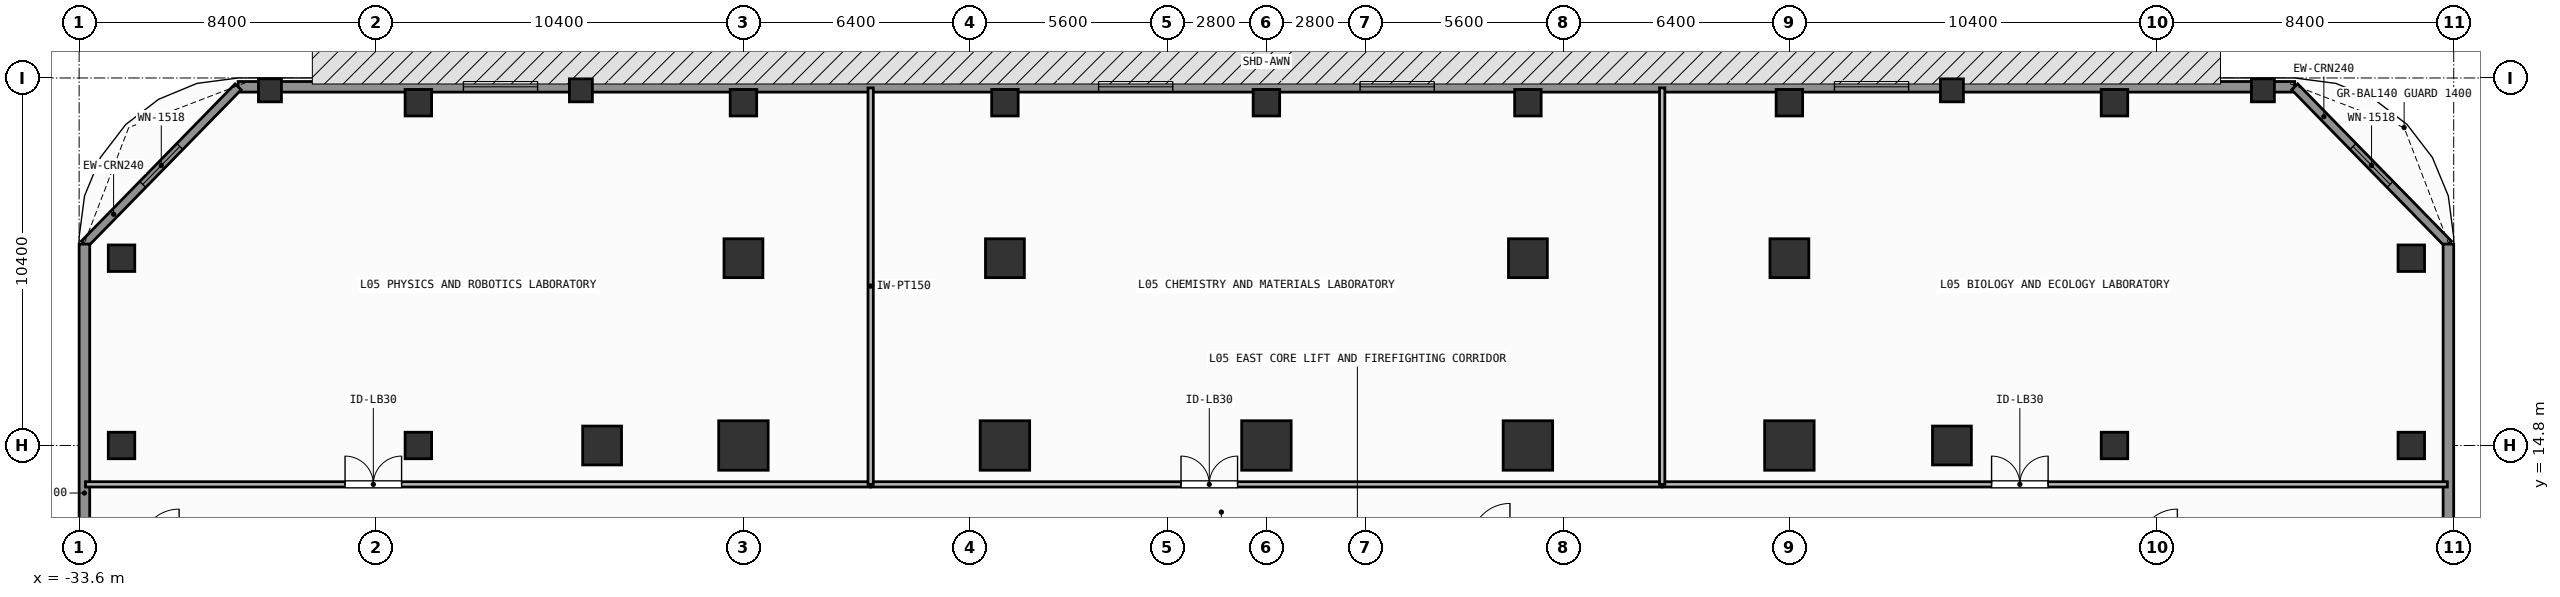
"""IFC4 building model, lengths in metres.
Left out: names, types, materials, properties, quantities, classifications, styles, units other than length and angle.
Written with IfcOpenShell. Run it as: python <this file> out.ifc"""

import sys

from ifc_helpers import new_model, si_unit, direction, frame, frame_2d, origin, origin_2d, place, context, subcontext, project, spatial, rectangle, extrude, element, fill, save


model = new_model("IFC4")
c1 = context("Model", 3, precision=1e-05, world=origin(), true_north=direction((0.0, 1.0)))
c2 = subcontext(c1, "Body", "Model", "MODEL_VIEW")
j1 = project(units=[si_unit("LENGTHUNIT", "METRE"), si_unit("PLANEANGLEUNIT", "RADIAN")], contexts=[c1])
p1 = place(None, origin())
s1 = spatial("IfcSite", under=j1, at=p1, CompositionType="ELEMENT")
p2 = place(p1, origin())
s2 = spatial("IfcBuilding", under=s1, at=p2, CompositionType="ELEMENT")
p3 = place(p2, frame((0.0, 0.0, 17.4)))
s3 = spatial("IfcBuildingStorey", under=s2, at=p3, CompositionType="ELEMENT", Elevation=17.4)
for number, where, z_axis, x_axis in (
    (1, (-14.8, 14.8, 0.0), (0.0, 0.0, 1.0), (1.0, 0.0, 0.0)),
    (2, (-7.4, 14.8, 0.0), (0.0, 0.0, 1.0), (1.0, 0.0, 0.0)),
    (3, (0.0, 14.8, 0.0), (0.0, 0.0, 1.0), (1.0, 0.0, 0.0)),
    (4, (7.4, 14.8, 0.0), (0.0, 0.0, 1.0), (1.0, 0.0, 0.0)),
    (5, (14.8, 14.8, 0.0), (0.0, 0.0, 1.0), (1.0, 0.0, 0.0)),
):
    element("IfcColumn", number, at=place(p3, frame(where, z_axis=z_axis, x_axis=x_axis)), inside=s3, PredefinedType="COLUMN", context=c2, shape_type="SweptSolid", body=[
        extrude(rectangle(XDim=1.4, YDim=1.4, at=origin_2d()), origin(), (0.0, 0.0, 1.0), 4.2),
    ])
for number, where, z_axis, x_axis in (
    (6, (-18.8, 14.8, 0.0), (0.0, 0.0, 1.0), (1.0, 0.0, 0.0)),
    (7, (19.4, 14.8, 0.0), (0.0, 0.0, 1.0), (1.0, 0.0, 0.0)),
    (8, (-14.8, 20.1, 0.0), (0.0, 0.0, 1.0), (1.0, 0.0, 0.0)),
    (9, (-7.4, 20.1, 0.0), (0.0, 0.0, 1.0), (1.0, 0.0, 0.0)),
    (10, (7.4, 20.1, 0.0), (0.0, 0.0, 1.0), (1.0, 0.0, 0.0)),
    (11, (14.8, 20.1, 0.0), (0.0, 0.0, 1.0), (1.0, 0.0, 0.0)),
):
    element("IfcColumn", number, at=place(p3, frame(where, z_axis=z_axis, x_axis=x_axis)), inside=s3, PredefinedType="COLUMN", context=c2, shape_type="SweptSolid", body=[
        extrude(rectangle(XDim=1.1, YDim=1.1, at=origin_2d()), origin(), (0.0, 0.0, 1.0), 4.2),
    ])
for number, where, z_axis, x_axis in (
    (12, (-32.4, 14.8, 0.0), (0.0, 0.0, 1.0), (1.0, 0.0, 0.0)),
    (13, (-24.0, 14.8, 0.0), (0.0, 0.0, 1.0), (1.0, 0.0, 0.0)),
    (14, (-24.0, 24.5, 0.0), (0.0, 0.0, 1.0), (1.0, 0.0, 0.0)),
    (15, (-14.8, 24.5, 0.0), (0.0, 0.0, 1.0), (1.0, 0.0, 0.0)),
    (16, (-7.4, 24.5, 0.0), (0.0, 0.0, 1.0), (1.0, 0.0, 0.0)),
    (17, (0.0, 24.5, 0.0), (0.0, 0.0, 1.0), (1.0, 0.0, 0.0)),
    (18, (7.4, 24.5, 0.0), (0.0, 0.0, 1.0), (1.0, 0.0, 0.0)),
    (19, (14.8, 24.5, 0.0), (0.0, 0.0, 1.0), (1.0, 0.0, 0.0)),
    (20, (24.0, 14.8, 0.0), (0.0, 0.0, 1.0), (1.0, 0.0, 0.0)),
    (21, (24.0, 24.5, 0.0), (0.0, 0.0, 1.0), (1.0, 0.0, 0.0)),
    (22, (32.4, 14.8, 0.0), (0.0, 0.0, 1.0), (1.0, 0.0, 0.0)),
    (23, (-32.4, 20.1, 0.0), (0.0, 0.0, 1.0), (1.0, 0.0, 0.0)),
    (24, (32.4, 20.1, 0.0), (0.0, 0.0, 1.0), (1.0, 0.0, 0.0)),
):
    element("IfcColumn", number, at=place(p3, frame(where, z_axis=z_axis, x_axis=x_axis)), inside=s3, PredefinedType="COLUMN", context=c2, shape_type="SweptSolid", body=[
        extrude(rectangle(XDim=0.75, YDim=0.75, at=origin_2d()), origin(), (0.0, 0.0, 1.0), 4.2),
    ])
for number, where, z_axis, x_axis in (
    (25, (-28.2, 24.85, 0.0), (0.0, 0.0, 1.0), (1.0, 0.0, 0.0)),
    (26, (-19.4, 24.85, 0.0), (0.0, 0.0, 1.0), (1.0, 0.0, 0.0)),
    (27, (19.4, 24.85, 0.0), (0.0, 0.0, 1.0), (1.0, 0.0, 0.0)),
    (28, (28.2, 24.85, 0.0), (0.0, 0.0, 1.0), (1.0, 0.0, 0.0)),
):
    element("IfcColumn", number, at=place(p3, frame(where, z_axis=z_axis, x_axis=x_axis)), inside=s3, PredefinedType="PILASTER", context=c2, shape_type="SweptSolid", body=[
        extrude(rectangle(XDim=0.65, YDim=0.65, at=origin_2d()), origin(), (0.0, 0.0, 1.0), 4.2),
    ])
p4 = place(p3, frame((-29.1, 24.95, 0.0), z_axis=(0.0, 0.0, 1.0), x_axis=(1.0, 0.0, 0.0)))
e29 = element("IfcWall", 29, at=p4, inside=s3, PredefinedType="SOLIDWALL", context=c2, shape_type="SweptSolid", body=[
    extrude(rectangle(XDim=58.2, YDim=0.3, at=frame_2d((29.1, 0.0))), origin(), (0.0, 0.0, 1.0), 3.96),
])
p5 = place(p4, frame((6.375, 0.0, 0.85)))
e30 = element("IfcOpeningElement", 30, at=p5, cuts=e29, PredefinedType="OPENING", context=c2, shape_type="SweptSolid", body=[
    extrude(rectangle(XDim=2.1, YDim=2.2, at=frame_2d((1.05, 1.1))), frame((0.0, 0.16, 0.0), z_axis=(0.0, -1.0, 0.0), x_axis=(1.0, 0.0, 0.0)), (0.0, 0.0, 1.0), 0.32),
])
p6 = place(p4, frame((24.35, 0.0, 0.85)))
e31 = element("IfcOpeningElement", 31, at=p6, cuts=e29, PredefinedType="OPENING", context=c2, shape_type="SweptSolid", body=[
    extrude(rectangle(XDim=2.1, YDim=2.2, at=frame_2d((1.05, 1.1))), frame((0.0, 0.16, 0.0), z_axis=(0.0, -1.0, 0.0), x_axis=(1.0, 0.0, 0.0)), (0.0, 0.0, 1.0), 0.32),
])
p7 = place(p4, frame((31.75, 0.0, 0.85)))
e32 = element("IfcOpeningElement", 32, at=p7, cuts=e29, PredefinedType="OPENING", context=c2, shape_type="SweptSolid", body=[
    extrude(rectangle(XDim=2.1, YDim=2.2, at=frame_2d((1.05, 1.1))), frame((0.0, 0.16, 0.0), z_axis=(0.0, -1.0, 0.0), x_axis=(1.0, 0.0, 0.0)), (0.0, 0.0, 1.0), 0.32),
])
p8 = place(p4, frame((45.175, 0.0, 0.85)))
e33 = element("IfcOpeningElement", 33, at=p8, cuts=e29, PredefinedType="OPENING", context=c2, shape_type="SweptSolid", body=[
    extrude(rectangle(XDim=2.1, YDim=2.2, at=frame_2d((1.05, 1.1))), frame((0.0, 0.16, 0.0), z_axis=(0.0, -1.0, 0.0), x_axis=(1.0, 0.0, 0.0)), (0.0, 0.0, 1.0), 0.32),
])
p9 = place(p3, frame((-33.45, 20.5, 0.0), z_axis=(0.0, 0.0, 1.0), x_axis=(0.69901822973, 0.715103848756, 0.0)))
e34 = element("IfcWall", 34, at=p9, inside=s3, PredefinedType="SOLIDWALL", context=c2, shape_type="SweptSolid", body=[
    extrude(rectangle(XDim=6.223, YDim=0.24, at=frame_2d((3.111, 0.0))), origin(), (0.0, 0.0, 1.0), 3.96),
])
p10 = place(p9, frame((2.362, 0.0, 0.85)))
e35 = element("IfcOpeningElement", 35, at=p10, cuts=e34, PredefinedType="OPENING", context=c2, shape_type="SweptSolid", body=[
    extrude(rectangle(XDim=1.5, YDim=1.85, at=frame_2d((0.75, 0.925))), frame((0.0, 0.13, 0.0), z_axis=(0.0, -1.0, 0.0), x_axis=(1.0, 0.0, 0.0)), (0.0, 0.0, 1.0), 0.26),
])
p11 = place(p3, frame((29.1, 24.95, 0.0), z_axis=(0.0, 0.0, 1.0), x_axis=(0.69901822973, -0.715103848756, 0.0)))
e36 = element("IfcWall", 36, at=p11, inside=s3, PredefinedType="SOLIDWALL", context=c2, shape_type="SweptSolid", body=[
    extrude(rectangle(XDim=6.223, YDim=0.24, at=frame_2d((3.111, 0.0))), origin(), (0.0, 0.0, 1.0), 3.96),
])
p12 = place(p11, frame((2.362, 0.0, 0.85)))
e37 = element("IfcOpeningElement", 37, at=p12, cuts=e36, PredefinedType="OPENING", context=c2, shape_type="SweptSolid", body=[
    extrude(rectangle(XDim=1.5, YDim=1.85, at=frame_2d((0.75, 0.925))), frame((0.0, 0.13, 0.0), z_axis=(0.0, -1.0, 0.0), x_axis=(1.0, 0.0, 0.0)), (0.0, 0.0, 1.0), 0.26),
])
for number, where, z_axis, x_axis in (
    (38, (-33.45, 6.41, 0.0), (0.0, 0.0, 1.0), (0.0, 1.0, 0.0)),
    (39, (33.45, 6.41, 0.0), (0.0, 0.0, 1.0), (0.0, 1.0, 0.0)),
):
    element("IfcWall", number, at=place(p3, frame(where, z_axis=z_axis, x_axis=x_axis)), inside=s3, PredefinedType="SOLIDWALL", context=c2, shape_type="SweptSolid", body=[
        extrude(rectangle(XDim=14.09, YDim=0.3, at=frame_2d((7.045, 0.0))), origin(), (0.0, 0.0, 1.0), 3.96),
    ])
p13 = place(p3, frame((-33.42, 13.7, 0.0), z_axis=(0.0, 0.0, 1.0), x_axis=(1.0, 0.0, 0.0)))
e40 = element("IfcWall", 40, at=p13, inside=s3, PredefinedType="PARTITIONING", context=c2, shape_type="SweptSolid", body=[
    extrude(rectangle(XDim=22.22, YDim=0.15, at=frame_2d((11.11, 0.0))), origin(), (0.0, 0.0, 1.0), 3.96),
])
p14 = place(p13, frame((7.346, 0.0, 0.0)))
e41 = element("IfcOpeningElement", 41, at=p14, cuts=e40, PredefinedType="OPENING", context=c2, shape_type="SweptSolid", body=[
    extrude(rectangle(XDim=1.6, YDim=2.3, at=frame_2d((0.8, 1.15))), frame((0.0, 0.085, 0.0), z_axis=(0.0, -1.0, 0.0), x_axis=(1.0, 0.0, 0.0)), (0.0, 0.0, 1.0), 0.17),
])
p15 = place(p3, frame((-11.2, 13.7, 0.0), z_axis=(0.0, 0.0, 1.0), x_axis=(1.0, 0.0, 0.0)))
e42 = element("IfcWall", 42, at=p15, inside=s3, PredefinedType="PARTITIONING", context=c2, shape_type="SweptSolid", body=[
    extrude(rectangle(XDim=22.4, YDim=0.15, at=frame_2d((11.2, 0.0))), origin(), (0.0, 0.0, 1.0), 3.96),
])
p16 = place(p15, frame((8.783, 0.0, 0.0)))
e43 = element("IfcOpeningElement", 43, at=p16, cuts=e42, PredefinedType="OPENING", context=c2, shape_type="SweptSolid", body=[
    extrude(rectangle(XDim=1.6, YDim=2.3, at=frame_2d((0.8, 1.15))), frame((0.0, 0.085, 0.0), z_axis=(0.0, -1.0, 0.0), x_axis=(1.0, 0.0, 0.0)), (0.0, 0.0, 1.0), 0.17),
])
p17 = place(p3, frame((11.2, 13.7, 0.0), z_axis=(0.0, 0.0, 1.0), x_axis=(1.0, 0.0, 0.0)))
e44 = element("IfcWall", 44, at=p17, inside=s3, PredefinedType="PARTITIONING", context=c2, shape_type="SweptSolid", body=[
    extrude(rectangle(XDim=22.22, YDim=0.15, at=frame_2d((11.11, 0.0))), origin(), (0.0, 0.0, 1.0), 3.96),
])
p18 = place(p17, frame((9.322, 0.0, 0.0)))
e45 = element("IfcOpeningElement", 45, at=p18, cuts=e44, PredefinedType="OPENING", context=c2, shape_type="SweptSolid", body=[
    extrude(rectangle(XDim=1.6, YDim=2.3, at=frame_2d((0.8, 1.15))), frame((0.0, 0.085, 0.0), z_axis=(0.0, -1.0, 0.0), x_axis=(1.0, 0.0, 0.0)), (0.0, 0.0, 1.0), 0.17),
])
for number, where, z_axis, x_axis in (
    (46, (-11.2, 13.7, 0.0), (0.0, 0.0, 1.0), (0.0, 1.0, 0.0)),
    (47, (11.2, 13.7, 0.0), (0.0, 0.0, 1.0), (0.0, 1.0, 0.0)),
):
    element("IfcWall", number, at=place(p3, frame(where, z_axis=z_axis, x_axis=x_axis)), inside=s3, PredefinedType="PARTITIONING", context=c2, shape_type="SweptSolid", body=[
        extrude(rectangle(XDim=11.22, YDim=0.15, at=frame_2d((5.61, 0.0))), origin(), (0.0, 0.0, 1.0), 3.96),
    ])
p19 = place(p10, origin())
e48 = element("IfcWindow", 48, at=p19, inside=s3, PartitioningType="SINGLE_PANEL", PredefinedType="WINDOW", context=c2, shape_type="SweptSolid", body=[
    extrude(rectangle(XDim=1.5, YDim=1.85, at=frame_2d((0.75, 0.925))), frame((0.0, 0.03, 0.0), z_axis=(0.0, -1.0, 0.0), x_axis=(1.0, 0.0, 0.0)), (0.0, 0.0, 1.0), 0.06),
])
fill(e35, e48)
p20 = place(p12, origin())
e49 = element("IfcWindow", 49, at=p20, inside=s3, PartitioningType="SINGLE_PANEL", PredefinedType="WINDOW", context=c2, shape_type="SweptSolid", body=[
    extrude(rectangle(XDim=1.5, YDim=1.85, at=frame_2d((0.75, 0.925))), frame((0.0, 0.03, 0.0), z_axis=(0.0, -1.0, 0.0), x_axis=(1.0, 0.0, 0.0)), (0.0, 0.0, 1.0), 0.06),
])
fill(e37, e49)
p21 = place(p5, origin())
e50 = element("IfcWindow", 50, at=p21, inside=s3, PartitioningType="SINGLE_PANEL", PredefinedType="WINDOW", context=c2, shape_type="SweptSolid", body=[
    extrude(rectangle(XDim=2.1, YDim=2.2, at=frame_2d((1.05, 1.1))), frame((0.0, 0.03, 0.0), z_axis=(0.0, -1.0, 0.0), x_axis=(1.0, 0.0, 0.0)), (0.0, 0.0, 1.0), 0.06),
])
fill(e30, e50)
p22 = place(p6, origin())
e51 = element("IfcWindow", 51, at=p22, inside=s3, PartitioningType="SINGLE_PANEL", PredefinedType="WINDOW", context=c2, shape_type="SweptSolid", body=[
    extrude(rectangle(XDim=2.1, YDim=2.2, at=frame_2d((1.05, 1.1))), frame((0.0, 0.03, 0.0), z_axis=(0.0, -1.0, 0.0), x_axis=(1.0, 0.0, 0.0)), (0.0, 0.0, 1.0), 0.06),
])
fill(e31, e51)
p23 = place(p7, origin())
e52 = element("IfcWindow", 52, at=p23, inside=s3, PartitioningType="SINGLE_PANEL", PredefinedType="WINDOW", context=c2, shape_type="SweptSolid", body=[
    extrude(rectangle(XDim=2.1, YDim=2.2, at=frame_2d((1.05, 1.1))), frame((0.0, 0.03, 0.0), z_axis=(0.0, -1.0, 0.0), x_axis=(1.0, 0.0, 0.0)), (0.0, 0.0, 1.0), 0.06),
])
fill(e32, e52)
p24 = place(p8, origin())
e53 = element("IfcWindow", 53, at=p24, inside=s3, PartitioningType="SINGLE_PANEL", PredefinedType="WINDOW", context=c2, shape_type="SweptSolid", body=[
    extrude(rectangle(XDim=2.1, YDim=2.2, at=frame_2d((1.05, 1.1))), frame((0.0, 0.03, 0.0), z_axis=(0.0, -1.0, 0.0), x_axis=(1.0, 0.0, 0.0)), (0.0, 0.0, 1.0), 0.06),
])
fill(e33, e53)
p25 = place(p14, origin())
e54 = element("IfcDoor", 54, at=p25, inside=s3, OperationType="SINGLE_SWING_LEFT", PredefinedType="DOOR", context=c2, shape_type="SweptSolid", body=[
    extrude(rectangle(XDim=1.6, YDim=2.3, at=frame_2d((0.8, 1.15))), frame((0.0, 0.025, 0.0), z_axis=(0.0, -1.0, 0.0), x_axis=(1.0, 0.0, 0.0)), (0.0, 0.0, 1.0), 0.05),
])
fill(e41, e54)
p26 = place(p16, origin())
e55 = element("IfcDoor", 55, at=p26, inside=s3, OperationType="SINGLE_SWING_LEFT", PredefinedType="DOOR", context=c2, shape_type="SweptSolid", body=[
    extrude(rectangle(XDim=1.6, YDim=2.3, at=frame_2d((0.8, 1.15))), frame((0.0, 0.025, 0.0), z_axis=(0.0, -1.0, 0.0), x_axis=(1.0, 0.0, 0.0)), (0.0, 0.0, 1.0), 0.05),
])
fill(e43, e55)
p27 = place(p18, origin())
e56 = element("IfcDoor", 56, at=p27, inside=s3, OperationType="SINGLE_SWING_LEFT", PredefinedType="DOOR", context=c2, shape_type="SweptSolid", body=[
    extrude(rectangle(XDim=1.6, YDim=2.3, at=frame_2d((0.8, 1.15))), frame((0.0, 0.025, 0.0), z_axis=(0.0, -1.0, 0.0), x_axis=(1.0, 0.0, 0.0)), (0.0, 0.0, 1.0), 0.05),
])
fill(e45, e56)
save(model, sys.argv[1])
